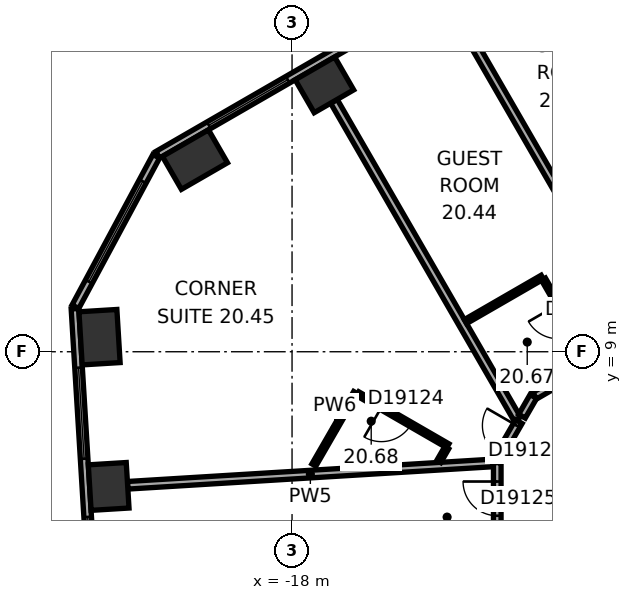
"""IFC4 building model, lengths in metres.
Left out: names, types, materials, properties, quantities, classifications, styles, units other than length and angle.
Written with IfcOpenShell. Run it as: python <this file> out.ifc"""

import sys

from ifc_helpers import new_model, si_unit, direction, frame, frame_2d, origin, origin_2d, place, context, subcontext, project, spatial, rectangle, extrude, element, fill, save


model = new_model("IFC4")
c1 = context("Model", 3, precision=1e-05, world=origin(), true_north=direction((0.0, 1.0)))
c2 = subcontext(c1, "Body", "Model", "MODEL_VIEW")
j1 = project(units=[si_unit("LENGTHUNIT", "METRE"), si_unit("PLANEANGLEUNIT", "RADIAN")], contexts=[c1])
p1 = place(None, origin())
s1 = spatial("IfcSite", under=j1, at=p1, CompositionType="ELEMENT")
p2 = place(p1, origin())
s2 = spatial("IfcBuilding", under=s1, at=p2, CompositionType="ELEMENT")
p3 = place(p2, frame((0.0, 0.0, 90.2)))
s3 = spatial("IfcBuildingStorey", under=s2, at=p3, CompositionType="ELEMENT", Elevation=90.2)
p4 = place(p3, frame((-17.148, 16.023, 0.0), z_axis=(0.0, 0.0, 1.0), x_axis=(-0.866025403784, -0.5, 0.0)))
e1 = element("IfcColumn", 1, at=p4, inside=s3, PredefinedType="COLUMN", context=c2, shape_type="SweptSolid", body=[
    extrude(rectangle(XDim=1.2, YDim=1.0, at=origin_2d()), origin(), (0.0, 0.0, 1.0), 3.3),
])
for number, where, z_axis, x_axis in (
    (2, (-20.555, 14.055, 0.0), (0.0, 0.0, 1.0), (-0.866, -0.5, 0.0)),
    (3, (-23.066, 9.383, 0.0), (0.0, 0.0, 1.0), (0.061, -0.998, 0.0)),
):
    element("IfcColumn", number, at=place(p3, frame(where, z_axis=z_axis, x_axis=x_axis)), inside=s3, PredefinedType="COLUMN", context=c2, shape_type="SweptSolid", body=[
        extrude(rectangle(XDim=1.4, YDim=1.0, at=origin_2d()), origin(), (0.0, 0.0, 1.0), 3.3),
    ])
p5 = place(p3, frame((-22.826, 5.456, 0.0), z_axis=(0.0, 0.0, 1.0), x_axis=(0.061048539535, -0.998134798422, 0.0)))
e4 = element("IfcColumn", 4, at=p5, inside=s3, PredefinedType="COLUMN", context=c2, shape_type="SweptSolid", body=[
    extrude(rectangle(XDim=1.2, YDim=1.0, at=origin_2d()), origin(), (0.0, 0.0, 1.0), 3.3),
])
p6 = place(p3, frame((-3.136, 24.805, 0.0), z_axis=(0.0, 0.0, 1.0), x_axis=(-0.866028291626, -0.499994998079, 0.0)))
e5 = element("IfcWall", 5, at=p6, inside=s3, PredefinedType="STANDARD", context=c2, shape_type="SweptSolid", body=[
    extrude(rectangle(XDim=21.246, YDim=0.2, at=frame_2d((10.623, 0.0))), origin(), (0.0, 0.0, 1.0), 3.3),
])
p7 = place(p6, frame((1.555, 0.0, 0.8)))
e6 = element("IfcOpeningElement", 6, at=p7, cuts=e5, PredefinedType="OPENING", context=c2, shape_type="SweptSolid", body=[
    extrude(rectangle(XDim=2.4, YDim=1.7, at=frame_2d((1.2, 0.85))), frame((0.0, 0.11, 0.0), z_axis=(0.0, -1.0, 0.0), x_axis=(1.0, 0.0, 0.0)), (0.0, 0.0, 1.0), 0.22),
])
p8 = place(p6, frame((5.489, 0.0, 0.8)))
e7 = element("IfcOpeningElement", 7, at=p8, cuts=e5, PredefinedType="OPENING", context=c2, shape_type="SweptSolid", body=[
    extrude(rectangle(XDim=2.4, YDim=1.7, at=frame_2d((1.2, 0.85))), frame((0.0, 0.11, 0.0), z_axis=(0.0, -1.0, 0.0), x_axis=(1.0, 0.0, 0.0)), (0.0, 0.0, 1.0), 0.22),
])
p9 = place(p6, frame((9.424, 0.0, 0.8)))
e8 = element("IfcOpeningElement", 8, at=p9, cuts=e5, PredefinedType="OPENING", context=c2, shape_type="SweptSolid", body=[
    extrude(rectangle(XDim=2.4, YDim=1.7, at=frame_2d((1.2, 0.85))), frame((0.0, 0.11, 0.0), z_axis=(0.0, -1.0, 0.0), x_axis=(1.0, 0.0, 0.0)), (0.0, 0.0, 1.0), 0.22),
])
p10 = place(p6, frame((13.358, 0.0, 0.8)))
e9 = element("IfcOpeningElement", 9, at=p10, cuts=e5, PredefinedType="OPENING", context=c2, shape_type="SweptSolid", body=[
    extrude(rectangle(XDim=2.4, YDim=1.7, at=frame_2d((1.2, 0.85))), frame((0.0, 0.11, 0.0), z_axis=(0.0, -1.0, 0.0), x_axis=(1.0, 0.0, 0.0)), (0.0, 0.0, 1.0), 0.22),
])
p11 = place(p6, frame((17.293, 0.0, 0.8)))
e10 = element("IfcOpeningElement", 10, at=p11, cuts=e5, PredefinedType="OPENING", context=c2, shape_type="SweptSolid", body=[
    extrude(rectangle(XDim=2.4, YDim=1.7, at=frame_2d((1.2, 0.85))), frame((0.0, 0.11, 0.0), z_axis=(0.0, -1.0, 0.0), x_axis=(1.0, 0.0, 0.0)), (0.0, 0.0, 1.0), 0.22),
])
p12 = place(p3, frame((-21.574, 14.143, 0.0), z_axis=(0.0, 0.0, 1.0), x_axis=(-0.473292949472, -0.880905093628, 0.0)))
e11 = element("IfcWall", 11, at=p12, inside=s3, PredefinedType="STANDARD", context=c2, shape_type="SweptSolid", body=[
    extrude(rectangle(XDim=4.494, YDim=0.2, at=frame_2d((2.247, 0.0))), origin(), (0.0, 0.0, 1.0), 3.3),
])
p13 = place(p12, frame((0.747, 0.0, 0.8)))
e12 = element("IfcOpeningElement", 12, at=p13, cuts=e11, PredefinedType="OPENING", context=c2, shape_type="SweptSolid", body=[
    extrude(rectangle(XDim=3.0, YDim=1.7, at=frame_2d((1.5, 0.85))), frame((0.0, 0.11, 0.0), z_axis=(0.0, -1.0, 0.0), x_axis=(1.0, 0.0, 0.0)), (0.0, 0.0, 1.0), 0.22),
])
p14 = place(p3, frame((-23.713, 10.131, 0.0), z_axis=(0.0, 0.0, 1.0), x_axis=(0.061040439785, -0.998135293791, 0.0)))
e13 = element("IfcWall", 13, at=p14, inside=s3, PredefinedType="STANDARD", context=c2, shape_type="SweptSolid", body=[
    extrude(rectangle(XDim=21.246, YDim=0.2, at=frame_2d((10.623, 0.0))), origin(), (0.0, 0.0, 1.0), 3.3),
])
p15 = place(p14, frame((1.553, 0.0, 0.8)))
e14 = element("IfcOpeningElement", 14, at=p15, cuts=e13, PredefinedType="OPENING", context=c2, shape_type="SweptSolid", body=[
    extrude(rectangle(XDim=2.4, YDim=1.7, at=frame_2d((1.2, 0.85))), frame((0.0, 0.11, 0.0), z_axis=(0.0, -1.0, 0.0), x_axis=(1.0, 0.0, 0.0)), (0.0, 0.0, 1.0), 0.22),
])
p16 = place(p14, frame((5.488, 0.0, 0.8)))
e15 = element("IfcOpeningElement", 15, at=p16, cuts=e13, PredefinedType="OPENING", context=c2, shape_type="SweptSolid", body=[
    extrude(rectangle(XDim=2.4, YDim=1.7, at=frame_2d((1.2, 0.85))), frame((0.0, 0.11, 0.0), z_axis=(0.0, -1.0, 0.0), x_axis=(1.0, 0.0, 0.0)), (0.0, 0.0, 1.0), 0.22),
])
p17 = place(p14, frame((9.422, 0.0, 0.8)))
e16 = element("IfcOpeningElement", 16, at=p17, cuts=e13, PredefinedType="OPENING", context=c2, shape_type="SweptSolid", body=[
    extrude(rectangle(XDim=2.4, YDim=1.7, at=frame_2d((1.2, 0.85))), frame((0.0, 0.11, 0.0), z_axis=(0.0, -1.0, 0.0), x_axis=(1.0, 0.0, 0.0)), (0.0, 0.0, 1.0), 0.22),
])
p18 = place(p14, frame((13.357, 0.0, 0.8)))
e17 = element("IfcOpeningElement", 17, at=p18, cuts=e13, PredefinedType="OPENING", context=c2, shape_type="SweptSolid", body=[
    extrude(rectangle(XDim=2.4, YDim=1.7, at=frame_2d((1.2, 0.85))), frame((0.0, 0.11, 0.0), z_axis=(0.0, -1.0, 0.0), x_axis=(1.0, 0.0, 0.0)), (0.0, 0.0, 1.0), 0.22),
])
p19 = place(p14, frame((17.292, 0.0, 0.8)))
e18 = element("IfcOpeningElement", 18, at=p19, cuts=e13, PredefinedType="OPENING", context=c2, shape_type="SweptSolid", body=[
    extrude(rectangle(XDim=2.4, YDim=1.7, at=frame_2d((1.2, 0.85))), frame((0.0, 0.11, 0.0), z_axis=(0.0, -1.0, 0.0), x_axis=(1.0, 0.0, 0.0)), (0.0, 0.0, 1.0), 0.22),
])
p20 = place(p3, frame((-22.327, 5.486, 0.0), z_axis=(0.0, 0.0, 1.0), x_axis=(0.998135194863, 0.061042057435, 0.0)))
e19 = element("IfcWall", 19, at=p20, inside=s3, PredefinedType="PARTITIONING", context=c2, shape_type="SweptSolid", body=[
    extrude(rectangle(XDim=9.635, YDim=0.2, at=frame_2d((4.817, 0.0))), origin(), (0.0, 0.0, 1.0), 3.05),
])
p21 = place(p3, frame((-17.426, 6.019, 0.0), z_axis=(0.0, 0.0, 1.0), x_axis=(0.50002983664, 0.866008176907, 0.0)))
e20 = element("IfcWall", 20, at=p21, inside=s3, PredefinedType="PARTITIONING", context=c2, shape_type="SweptSolid", body=[
    extrude(rectangle(XDim=2.2, YDim=0.12, at=frame_2d((1.1, 0.0))), origin(), (0.0, 0.0, 1.0), 3.05),
])
p22 = place(p3, frame((-16.898, 15.59, 0.0), z_axis=(0.0, 0.0, 1.0), x_axis=(0.499994742786, -0.866028439017, 0.0)))
e21 = element("IfcWall", 21, at=p22, inside=s3, PredefinedType="PARTITIONING", context=c2, shape_type="SweptSolid", body=[
    extrude(rectangle(XDim=9.65, YDim=0.2, at=frame_2d((4.825, 0.0))), origin(), (0.0, 0.0, 1.0), 3.05),
])
p23 = place(p3, frame((-16.274, 7.895, 0.0), z_axis=(0.0, 0.0, 1.0), x_axis=(0.865997131366, -0.500048966069, 0.0)))
e22 = element("IfcWall", 22, at=p23, inside=s3, PredefinedType="PARTITIONING", context=c2, shape_type="SweptSolid", body=[
    extrude(rectangle(XDim=2.74, YDim=0.12, at=frame_2d((1.37, 0.0))), origin(), (0.0, 0.0, 1.0), 3.05),
])
p24 = place(p23, frame((0.72, 0.0, 0.0)))
e23 = element("IfcOpeningElement", 23, at=p24, cuts=e22, PredefinedType="OPENING", context=c2, shape_type="SweptSolid", body=[
    extrude(rectangle(XDim=0.9, YDim=2.1, at=frame_2d((0.45, 1.05))), frame((0.0, 0.07, 0.0), z_axis=(0.0, -1.0, 0.0), x_axis=(1.0, 0.0, 0.0)), (0.0, 0.0, 1.0), 0.14),
])
p25 = place(p3, frame((-13.931, 6.472, 0.0), z_axis=(0.0, 0.0, 1.0), x_axis=(-0.499739399214, -0.866175809448, 0.0)))
e24 = element("IfcWall", 24, at=p25, inside=s3, PredefinedType="PARTITIONING", context=c2, shape_type="SweptSolid", body=[
    extrude(rectangle(XDim=0.416, YDim=0.12, at=frame_2d((0.208, 0.0))), origin(), (0.0, 0.0, 1.0), 3.05),
])
p26 = place(p3, frame((-13.436, 9.794, 0.0), z_axis=(0.0, 0.0, 1.0), x_axis=(0.866053246676, 0.499951771596, 0.0)))
e25 = element("IfcWall", 25, at=p26, inside=s3, PredefinedType="PARTITIONING", context=c2, shape_type="SweptSolid", body=[
    extrude(rectangle(XDim=2.335, YDim=0.12, at=frame_2d((1.167, 0.0))), origin(), (0.0, 0.0, 1.0), 3.05),
])
p27 = place(p3, frame((-12.6, 6.081, 0.0), z_axis=(0.0, 0.0, 1.0), x_axis=(0.0, -1.0, 0.0)))
e26 = element("IfcWall", 26, at=p27, inside=s3, PredefinedType="PARTITIONING", context=c2, shape_type="SweptSolid", body=[
    extrude(rectangle(XDim=12.219, YDim=0.2, at=frame_2d((6.109, 0.0))), origin(), (0.0, 0.0, 1.0), 3.05),
])
p28 = place(p27, frame((0.496, 0.0, 0.0)))
e27 = element("IfcOpeningElement", 27, at=p28, cuts=e26, PredefinedType="OPENING", context=c2, shape_type="SweptSolid", body=[
    extrude(rectangle(XDim=0.9, YDim=2.1, at=frame_2d((0.45, 1.05))), frame((0.0, 0.11, 0.0), z_axis=(0.0, -1.0, 0.0), x_axis=(1.0, 0.0, 0.0)), (0.0, 0.0, 1.0), 0.22),
])
p29 = place(p27, frame((5.463, 0.0, 0.0)))
e28 = element("IfcOpeningElement", 28, at=p29, cuts=e26, PredefinedType="OPENING", context=c2, shape_type="SweptSolid", body=[
    extrude(rectangle(XDim=0.9, YDim=2.1, at=frame_2d((0.45, 1.05))), frame((0.0, 0.11, 0.0), z_axis=(0.0, -1.0, 0.0), x_axis=(1.0, 0.0, 0.0)), (0.0, 0.0, 1.0), 0.22),
])
p30 = place(p27, frame((8.38, 0.0, 0.0)))
e29 = element("IfcOpeningElement", 29, at=p30, cuts=e26, PredefinedType="OPENING", context=c2, shape_type="SweptSolid", body=[
    extrude(rectangle(XDim=0.9, YDim=2.1, at=frame_2d((0.45, 1.05))), frame((0.0, 0.11, 0.0), z_axis=(0.0, -1.0, 0.0), x_axis=(1.0, 0.0, 0.0)), (0.0, 0.0, 1.0), 0.22),
])
p31 = place(p3, frame((-12.032, 7.162, 0.0), z_axis=(0.0, 0.0, 1.0), x_axis=(-0.499951829968, -0.866053212979, 0.0)))
e30 = element("IfcWall", 30, at=p31, inside=s3, PredefinedType="PARTITIONING", context=c2, shape_type="SweptSolid", body=[
    extrude(rectangle(XDim=1.136, YDim=0.2, at=frame_2d((0.568, 0.0))), origin(), (0.0, 0.0, 1.0), 3.05),
])
p32 = place(p31, frame((0.118, 0.0, 0.0)))
e31 = element("IfcOpeningElement", 31, at=p32, cuts=e30, PredefinedType="OPENING", context=c2, shape_type="SweptSolid", body=[
    extrude(rectangle(XDim=0.9, YDim=2.1, at=frame_2d((0.45, 1.05))), frame((0.0, 0.11, 0.0), z_axis=(0.0, -1.0, 0.0), x_axis=(1.0, 0.0, 0.0)), (0.0, 0.0, 1.0), 0.22),
])
p33 = place(p3, frame((-11.65, 7.823, 0.0), z_axis=(0.0, 0.0, 1.0), x_axis=(-0.50012165622, -0.865955154139, 0.0)))
e32 = element("IfcWall", 32, at=p33, inside=s3, PredefinedType="PARTITIONING", context=c2, shape_type="SweptSolid", body=[
    extrude(rectangle(XDim=0.6, YDim=0.2, at=frame_2d((0.3, 0.0))), origin(), (0.0, 0.0, 1.0), 3.05),
])
p34 = place(p3, frame((-11.385, 10.909, 0.0), z_axis=(0.0, 0.0, 1.0), x_axis=(0.500077547548, -0.865980627057, 0.0)))
e33 = element("IfcWall", 33, at=p34, inside=s3, PredefinedType="PARTITIONING", context=c2, shape_type="SweptSolid", body=[
    extrude(rectangle(XDim=2.44, YDim=0.12, at=frame_2d((1.22, 0.0))), origin(), (0.0, 0.0, 1.0), 3.05),
])
p35 = place(p34, frame((0.77, 0.0, 0.0)))
e34 = element("IfcOpeningElement", 34, at=p35, cuts=e33, PredefinedType="OPENING", context=c2, shape_type="SweptSolid", body=[
    extrude(rectangle(XDim=0.9, YDim=2.1, at=frame_2d((0.45, 1.05))), frame((0.0, 0.07, 0.0), z_axis=(0.0, -1.0, 0.0), x_axis=(1.0, 0.0, 0.0)), (0.0, 0.0, 1.0), 0.14),
])
p36 = place(p3, frame((-8.902, 9.41, 0.0), z_axis=(0.0, 0.0, 1.0), x_axis=(-0.866014299198, -0.500019233215, 0.0)))
e35 = element("IfcWall", 35, at=p36, inside=s3, PredefinedType="PARTITIONING", context=c2, shape_type="SweptSolid", body=[
    extrude(rectangle(XDim=3.133, YDim=0.2, at=frame_2d((1.567, 0.0))), origin(), (0.0, 0.0, 1.0), 3.05),
])
p37 = place(p36, frame((0.225, 0.0, 0.0)))
e36 = element("IfcOpeningElement", 36, at=p37, cuts=e35, PredefinedType="OPENING", context=c2, shape_type="SweptSolid", body=[
    extrude(rectangle(XDim=0.9, YDim=2.1, at=frame_2d((0.45, 1.05))), frame((0.0, 0.11, 0.0), z_axis=(0.0, -1.0, 0.0), x_axis=(1.0, 0.0, 0.0)), (0.0, 0.0, 1.0), 0.22),
])
p38 = place(p3, frame((-7.865, 7.814, 0.0), z_axis=(0.0, 0.0, 1.0), x_axis=(-0.500004234368, 0.866022959057, 0.0)))
e37 = element("IfcWall", 37, at=p38, inside=s3, PredefinedType="PARTITIONING", context=c2, shape_type="SweptSolid", body=[
    extrude(rectangle(XDim=11.25, YDim=0.2, at=frame_2d((5.625, 0.0))), origin(), (0.0, 0.0, 1.0), 3.05),
])
p39 = place(p38, frame((0.5, 0.0, 0.0)))
e38 = element("IfcOpeningElement", 38, at=p39, cuts=e37, PredefinedType="OPENING", context=c2, shape_type="SweptSolid", body=[
    extrude(rectangle(XDim=0.9, YDim=2.1, at=frame_2d((0.45, 1.05))), frame((0.0, 0.11, 0.0), z_axis=(0.0, -1.0, 0.0), x_axis=(1.0, 0.0, 0.0)), (0.0, 0.0, 1.0), 0.22),
])
p40 = place(p11, origin())
e39 = element("IfcWindow", 39, at=p40, inside=s3, PartitioningType="SINGLE_PANEL", PredefinedType="WINDOW", context=c2, shape_type="SweptSolid", body=[
    extrude(rectangle(XDim=2.4, YDim=1.7, at=frame_2d((1.2, 0.85))), frame((0.0, 0.03, 0.0), z_axis=(0.0, -1.0, 0.0), x_axis=(1.0, 0.0, 0.0)), (0.0, 0.0, 1.0), 0.06),
])
fill(e10, e39)
p41 = place(p13, origin())
e40 = element("IfcWindow", 40, at=p41, inside=s3, PartitioningType="SINGLE_PANEL", PredefinedType="WINDOW", context=c2, shape_type="SweptSolid", body=[
    extrude(rectangle(XDim=3.0, YDim=1.7, at=frame_2d((1.5, 0.85))), frame((0.0, 0.03, 0.0), z_axis=(0.0, -1.0, 0.0), x_axis=(1.0, 0.0, 0.0)), (0.0, 0.0, 1.0), 0.06),
])
fill(e12, e40)
p42 = place(p15, origin())
e41 = element("IfcWindow", 41, at=p42, inside=s3, PartitioningType="SINGLE_PANEL", PredefinedType="WINDOW", context=c2, shape_type="SweptSolid", body=[
    extrude(rectangle(XDim=2.4, YDim=1.7, at=frame_2d((1.2, 0.85))), frame((0.0, 0.03, 0.0), z_axis=(0.0, -1.0, 0.0), x_axis=(1.0, 0.0, 0.0)), (0.0, 0.0, 1.0), 0.06),
])
fill(e14, e41)
p43 = place(p16, origin())
e42 = element("IfcWindow", 42, at=p43, inside=s3, PartitioningType="SINGLE_PANEL", PredefinedType="WINDOW", context=c2, shape_type="SweptSolid", body=[
    extrude(rectangle(XDim=2.4, YDim=1.7, at=frame_2d((1.2, 0.85))), frame((0.0, 0.03, 0.0), z_axis=(0.0, -1.0, 0.0), x_axis=(1.0, 0.0, 0.0)), (0.0, 0.0, 1.0), 0.06),
])
fill(e15, e42)
p44 = place(p32, origin())
e43 = element("IfcDoor", 43, at=p44, inside=s3, OperationType="SINGLE_SWING_LEFT", PredefinedType="DOOR", context=c2, shape_type="SweptSolid", body=[
    extrude(rectangle(XDim=0.9, YDim=2.1, at=frame_2d((0.45, 1.05))), frame((0.0, 0.025, 0.0), z_axis=(0.0, -1.0, 0.0), x_axis=(1.0, 0.0, 0.0)), (0.0, 0.0, 1.0), 0.05),
])
fill(e31, e43)
p45 = place(p24, origin())
e44 = element("IfcDoor", 44, at=p45, inside=s3, OperationType="SINGLE_SWING_LEFT", PredefinedType="DOOR", context=c2, shape_type="SweptSolid", body=[
    extrude(rectangle(XDim=0.9, YDim=2.1, at=frame_2d((0.45, 1.05))), frame((0.0, 0.025, 0.0), z_axis=(0.0, -1.0, 0.0), x_axis=(1.0, 0.0, 0.0)), (0.0, 0.0, 1.0), 0.05),
])
fill(e23, e44)
p46 = place(p28, origin())
e45 = element("IfcDoor", 45, at=p46, inside=s3, OperationType="SINGLE_SWING_LEFT", PredefinedType="DOOR", context=c2, shape_type="SweptSolid", body=[
    extrude(rectangle(XDim=0.9, YDim=2.1, at=frame_2d((0.45, 1.05))), frame((0.0, 0.025, 0.0), z_axis=(0.0, -1.0, 0.0), x_axis=(1.0, 0.0, 0.0)), (0.0, 0.0, 1.0), 0.05),
])
fill(e27, e45)
save(model, sys.argv[1])
